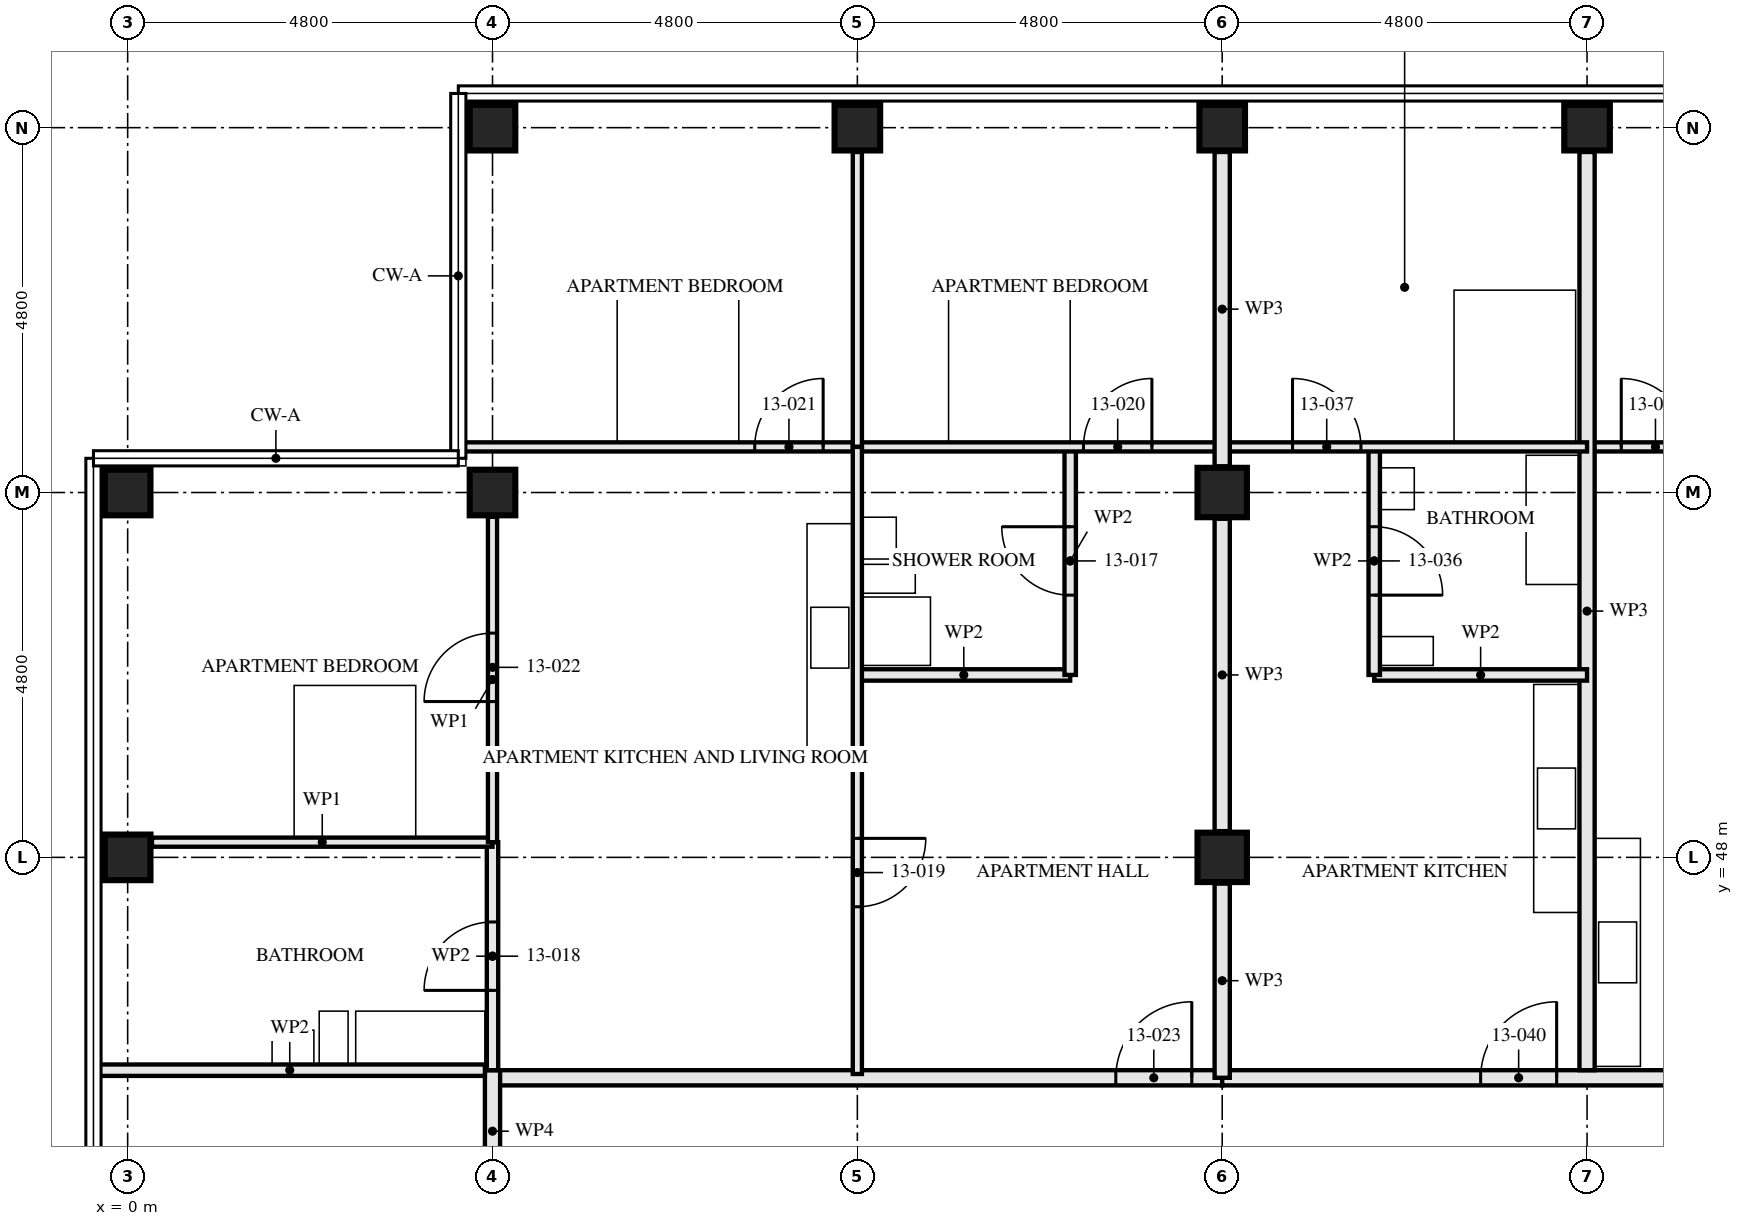
"""IFC4 building model, lengths in metres.
Left out: names, types, materials, properties, quantities, classifications, styles, units other than length and angle.
Written with IfcOpenShell. Run it as: python <this file> out.ifc"""

import sys

from ifc_helpers import new_model, si_unit, direction, frame, frame_2d, origin, origin_2d, place, context, subcontext, project, spatial, rectangle, hollow_rectangle, extrude, element, fill, save


model = new_model("IFC4")
c1 = context("Model", 3, precision=1e-05, world=origin(), true_north=direction((0.0, 1.0)))
c2 = subcontext(c1, "Body", "Model", "MODEL_VIEW")
j1 = project(units=[si_unit("LENGTHUNIT", "METRE"), si_unit("PLANEANGLEUNIT", "RADIAN")], contexts=[c1])
p1 = place(None, origin())
s1 = spatial("IfcSite", under=j1, at=p1, CompositionType="ELEMENT")
p2 = place(p1, origin())
s2 = spatial("IfcBuilding", under=s1, at=p2, CompositionType="ELEMENT")
p3 = place(p2, frame((0.0, 0.0, 51.5)))
s3 = spatial("IfcBuildingStorey", under=s2, at=p3, CompositionType="ELEMENT", Elevation=51.5)
p4 = place(p3, frame((0.0, 48.0, 0.0), z_axis=(0.0, 0.0, 1.0), x_axis=(1.0, 0.0, 0.0)))
e1 = element("IfcColumn", 1, at=p4, inside=s3, PredefinedType="COLUMN", context=c2, shape_type="SweptSolid", body=[
    extrude(hollow_rectangle(XDim=0.6, YDim=0.6, WallThickness=0.08, at=origin_2d()), origin(), (0.0, 0.0, 1.0), 3.5),
])
for number, where, z_axis, x_axis in (
    (2, (0.0, 52.8, 0.0), (0.0, 0.0, 1.0), (0.0, 1.0, 0.0)),
    (3, (4.8, 52.8, 0.0), (0.0, 0.0, 1.0), (0.0, 1.0, 0.0)),
    (4, (4.8, 57.6, 0.0), (0.0, 0.0, 1.0), (0.0, 1.0, 0.0)),
):
    element("IfcColumn", number, at=place(p3, frame(where, z_axis=z_axis, x_axis=x_axis)), inside=s3, PredefinedType="COLUMN", context=c2, shape_type="SweptSolid", body=[
        extrude(hollow_rectangle(XDim=0.6, YDim=0.6, WallThickness=0.06, at=origin_2d()), origin(), (0.0, 0.0, 1.0), 3.5),
    ])
p5 = place(p3, frame((9.6, 57.6, 0.0), z_axis=(0.0, 0.0, 1.0), x_axis=(0.0, 1.0, 0.0)))
e5 = element("IfcColumn", 5, at=p5, inside=s3, PredefinedType="COLUMN", context=c2, shape_type="SweptSolid", body=[
    extrude(hollow_rectangle(XDim=0.6, YDim=0.6, WallThickness=0.08, at=origin_2d()), origin(), (0.0, 0.0, 1.0), 3.5),
])
for number, where, z_axis, x_axis in (
    (6, (14.4, 48.0, 0.0), (0.0, 0.0, 1.0), (1.0, 0.0, 0.0)),
    (7, (14.4, 52.8, 0.0), (0.0, 0.0, 1.0), (1.0, 0.0, 0.0)),
):
    element("IfcColumn", number, at=place(p3, frame(where, z_axis=z_axis, x_axis=x_axis)), inside=s3, PredefinedType="COLUMN", context=c2, shape_type="SweptSolid", body=[
        extrude(hollow_rectangle(XDim=0.65, YDim=0.65, WallThickness=0.05, at=origin_2d()), origin(), (0.0, 0.0, 1.0), 3.5),
    ])
for number, where, z_axis, x_axis in (
    (8, (14.4, 57.6, 0.0), (0.0, 0.0, 1.0), (0.0, 1.0, 0.0)),
    (9, (19.2, 57.6, 0.0), (0.0, 0.0, 1.0), (0.0, 1.0, 0.0)),
):
    element("IfcColumn", number, at=place(p3, frame(where, z_axis=z_axis, x_axis=x_axis)), inside=s3, PredefinedType="COLUMN", context=c2, shape_type="SweptSolid", body=[
        extrude(hollow_rectangle(XDim=0.6, YDim=0.6, WallThickness=0.08, at=origin_2d()), origin(), (0.0, 0.0, 1.0), 3.5),
    ])
p6 = place(p3, frame((12.4, 53.4, 0.0), z_axis=(0.0, 0.0, 1.0), x_axis=(0.0, -1.0, 0.0)))
e10 = element("IfcWall", 10, at=p6, inside=s3, PredefinedType="PARTITIONING", context=c2, shape_type="SweptSolid", body=[
    extrude(rectangle(XDim=3.0, YDim=0.15, at=frame_2d((1.5, 0.0))), origin(), (0.0, 0.0, 1.0), 2.55),
])
p7 = place(p6, frame((1.05, 0.0, 0.0)))
e11 = element("IfcOpeningElement", 11, at=p7, cuts=e10, PredefinedType="OPENING", context=c2, shape_type="SweptSolid", body=[
    extrude(rectangle(XDim=0.9, YDim=2.1, at=frame_2d((0.45, 1.05))), frame((0.0, 0.085, 0.0), z_axis=(0.0, -1.0, 0.0), x_axis=(1.0, 0.0, 0.0)), (0.0, 0.0, 1.0), 0.171),
])
p8 = place(p3, frame((12.4, 50.4, 0.0), z_axis=(0.0, 0.0, 1.0), x_axis=(-1.0, 0.0, 0.0)))
e12 = element("IfcWall", 12, at=p8, inside=s3, PredefinedType="PARTITIONING", context=c2, shape_type="SweptSolid", body=[
    extrude(rectangle(XDim=2.8, YDim=0.15, at=frame_2d((1.4, 0.0))), origin(), (0.0, 0.0, 1.0), 3.33),
])
p9 = place(p3, frame((4.8, 48.2, 0.0), z_axis=(0.0, 0.0, 1.0), x_axis=(0.0, -1.0, 0.0)))
e13 = element("IfcWall", 13, at=p9, inside=s3, PredefinedType="PARTITIONING", context=c2, shape_type="SweptSolid", body=[
    extrude(rectangle(XDim=3.0, YDim=0.15, at=frame_2d((1.5, 0.0))), origin(), (0.0, 0.0, 1.0), 2.55),
])
p10 = place(p9, frame((1.05, 0.0, 0.0)))
e14 = element("IfcOpeningElement", 14, at=p10, cuts=e13, PredefinedType="OPENING", context=c2, shape_type="SweptSolid", body=[
    extrude(rectangle(XDim=0.9, YDim=2.1, at=frame_2d((0.45, 1.05))), frame((0.0, 0.085, 0.0), z_axis=(0.0, -1.0, 0.0), x_axis=(1.0, 0.0, 0.0)), (0.0, 0.0, 1.0), 0.171),
])
p11 = place(p3, frame((9.6, 53.4, 0.0), z_axis=(0.0, 0.0, 1.0), x_axis=(0.0, -1.0, 0.0)))
e15 = element("IfcWall", 15, at=p11, inside=s3, PredefinedType="PARTITIONING", context=c2, shape_type="SweptSolid", body=[
    extrude(rectangle(XDim=8.25, YDim=0.12, at=frame_2d((4.125, 0.0))), origin(), (0.0, 0.0, 1.0), 2.55),
])
p12 = place(p11, frame((5.15, 0.0, 0.0)))
e16 = element("IfcOpeningElement", 16, at=p12, cuts=e15, PredefinedType="OPENING", context=c2, shape_type="SweptSolid", body=[
    extrude(rectangle(XDim=0.9, YDim=2.1, at=frame_2d((0.45, 1.05))), frame((0.0, 0.071, 0.0), z_axis=(0.0, -1.0, 0.0), x_axis=(1.0, 0.0, 0.0)), (0.0, 0.0, 1.0), 0.141),
])
p13 = place(p3, frame((14.4, 53.4, 0.0), z_axis=(0.0, 0.0, 1.0), x_axis=(-1.0, 0.0, 0.0)))
e17 = element("IfcWall", 17, at=p13, inside=s3, PredefinedType="PARTITIONING", context=c2, shape_type="SweptSolid", body=[
    extrude(rectangle(XDim=4.8, YDim=0.12, at=frame_2d((2.4, 0.0))), origin(), (0.0, 0.0, 1.0), 3.33),
])
p14 = place(p13, frame((0.925, 0.0, 0.0)))
e18 = element("IfcOpeningElement", 18, at=p14, cuts=e17, PredefinedType="OPENING", context=c2, shape_type="SweptSolid", body=[
    extrude(rectangle(XDim=0.9, YDim=2.1, at=frame_2d((0.45, 1.05))), frame((0.0, 0.071, 0.0), z_axis=(0.0, -1.0, 0.0), x_axis=(1.0, 0.0, 0.0)), (0.0, 0.0, 1.0), 0.141),
])
p15 = place(p3, frame((9.6, 53.4, 0.0), z_axis=(0.0, 0.0, 1.0), x_axis=(-1.0, 0.0, 0.0)))
e19 = element("IfcWall", 19, at=p15, inside=s3, PredefinedType="PARTITIONING", context=c2, shape_type="SweptSolid", body=[
    extrude(rectangle(XDim=5.235, YDim=0.12, at=frame_2d((2.618, 0.0))), origin(), (0.0, 0.0, 1.0), 2.32),
])
p16 = place(p15, frame((0.45, 0.0, 0.0)))
e20 = element("IfcOpeningElement", 20, at=p16, cuts=e19, PredefinedType="OPENING", context=c2, shape_type="SweptSolid", body=[
    extrude(rectangle(XDim=0.9, YDim=2.1, at=frame_2d((0.45, 1.05))), frame((0.0, 0.071, 0.0), z_axis=(0.0, -1.0, 0.0), x_axis=(1.0, 0.0, 0.0)), (0.0, 0.0, 1.0), 0.141),
])
p17 = place(p3, frame((4.8, 48.2, 0.0), z_axis=(0.0, 0.0, 1.0), x_axis=(-1.0, 0.0, 0.0)))
e21 = element("IfcWall", 21, at=p17, inside=s3, PredefinedType="PARTITIONING", context=c2, shape_type="SweptSolid", body=[
    extrude(rectangle(XDim=4.48, YDim=0.12, at=frame_2d((2.24, 0.0))), origin(), (0.0, 0.0, 1.0), 3.33),
])
p18 = place(p3, frame((9.6, 57.28, 0.0), z_axis=(0.0, 0.0, 1.0), x_axis=(0.0, -1.0, 0.0)))
e22 = element("IfcWall", 22, at=p18, inside=s3, PredefinedType="PARTITIONING", context=c2, shape_type="SweptSolid", body=[
    extrude(rectangle(XDim=3.88, YDim=0.12, at=frame_2d((1.94, 0.0))), origin(), (0.0, 0.0, 1.0), 3.33),
])
p19 = place(p3, frame((4.8, 52.48, 0.0), z_axis=(0.0, 0.0, 1.0), x_axis=(0.0, -1.0, 0.0)))
e23 = element("IfcWall", 23, at=p19, inside=s3, PredefinedType="PARTITIONING", context=c2, shape_type="SweptSolid", body=[
    extrude(rectangle(XDim=4.28, YDim=0.12, at=frame_2d((2.14, 0.0))), origin(), (0.0, 0.0, 1.0), 3.33),
])
p20 = place(p19, frame((1.53, 0.0, 0.0)))
e24 = element("IfcOpeningElement", 24, at=p20, cuts=e23, PredefinedType="OPENING", context=c2, shape_type="SweptSolid", body=[
    extrude(rectangle(XDim=0.9, YDim=2.1, at=frame_2d((0.45, 1.05))), frame((0.0, 0.071, 0.0), z_axis=(0.0, -1.0, 0.0), x_axis=(1.0, 0.0, 0.0)), (0.0, 0.0, 1.0), 0.141),
])
p21 = place(p3, frame((14.4, 45.1, 0.0), z_axis=(0.0, 0.0, 1.0), x_axis=(-1.0, 0.0, 0.0)))
e25 = element("IfcWall", 25, at=p21, inside=s3, PredefinedType="PARTITIONING", context=c2, shape_type="SweptSolid", body=[
    extrude(rectangle(XDim=9.6, YDim=0.2, at=frame_2d((4.8, 0.0))), origin(), (0.0, 0.0, 1.0), 3.33),
])
p22 = place(p21, frame((0.4, 0.0, 0.0)))
e26 = element("IfcOpeningElement", 26, at=p22, cuts=e25, PredefinedType="OPENING", context=c2, shape_type="SweptSolid", body=[
    extrude(rectangle(XDim=1.0, YDim=2.1, at=frame_2d((0.5, 1.05))), frame((0.0, 0.111, 0.0), z_axis=(0.0, -1.0, 0.0), x_axis=(1.0, 0.0, 0.0)), (0.0, 0.0, 1.0), 0.221),
])
p23 = place(p3, frame((4.8, 45.2, 0.0), z_axis=(0.0, 0.0, 1.0), x_axis=(0.0, -1.0, 0.0)))
e27 = element("IfcWall", 27, at=p23, inside=s3, PredefinedType="PARTITIONING", context=c2, shape_type="SweptSolid", body=[
    extrude(rectangle(XDim=1.605, YDim=0.2, at=frame_2d((0.802, 0.0))), origin(), (0.0, 0.0, 1.0), 3.33),
])
p24 = place(p3, frame((24.0, 53.4, 0.0), z_axis=(0.0, 0.0, 1.0), x_axis=(-1.0, 0.0, 0.0)))
e28 = element("IfcWall", 28, at=p24, inside=s3, PredefinedType="PARTITIONING", context=c2, shape_type="SweptSolid", body=[
    extrude(rectangle(XDim=4.8, YDim=0.12, at=frame_2d((2.4, 0.0))), origin(), (0.0, 0.0, 1.0), 3.33),
])
p25 = place(p24, frame((3.45, 0.0, 0.0)))
e29 = element("IfcOpeningElement", 29, at=p25, cuts=e28, PredefinedType="OPENING", context=c2, shape_type="SweptSolid", body=[
    extrude(rectangle(XDim=0.9, YDim=2.1, at=frame_2d((0.45, 1.05))), frame((0.0, 0.071, 0.0), z_axis=(0.0, -1.0, 0.0), x_axis=(1.0, 0.0, 0.0)), (0.0, 0.0, 1.0), 0.141),
])
p26 = place(p3, frame((19.2, 57.28, 0.0), z_axis=(0.0, 0.0, 1.0), x_axis=(0.0, -1.0, 0.0)))
e30 = element("IfcWall", 30, at=p26, inside=s3, PredefinedType="PARTITIONING", context=c2, shape_type="SweptSolid", body=[
    extrude(rectangle(XDim=12.08, YDim=0.2, at=frame_2d((6.04, 0.0))), origin(), (0.0, 0.0, 1.0), 2.55),
])
p27 = place(p3, frame((16.4, 53.4, 0.0), z_axis=(0.0, 0.0, 1.0), x_axis=(0.0, -1.0, 0.0)))
e31 = element("IfcWall", 31, at=p27, inside=s3, PredefinedType="PARTITIONING", context=c2, shape_type="SweptSolid", body=[
    extrude(rectangle(XDim=3.0, YDim=0.15, at=frame_2d((1.5, 0.0))), origin(), (0.0, 0.0, 1.0), 2.55),
])
p28 = place(p27, frame((1.05, 0.0, 0.0)))
e32 = element("IfcOpeningElement", 32, at=p28, cuts=e31, PredefinedType="OPENING", context=c2, shape_type="SweptSolid", body=[
    extrude(rectangle(XDim=0.9, YDim=2.1, at=frame_2d((0.45, 1.05))), frame((0.0, 0.085, 0.0), z_axis=(0.0, -1.0, 0.0), x_axis=(1.0, 0.0, 0.0)), (0.0, 0.0, 1.0), 0.171),
])
p29 = place(p3, frame((19.2, 50.4, 0.0), z_axis=(0.0, 0.0, 1.0), x_axis=(-1.0, 0.0, 0.0)))
e33 = element("IfcWall", 33, at=p29, inside=s3, PredefinedType="PARTITIONING", context=c2, shape_type="SweptSolid", body=[
    extrude(rectangle(XDim=2.8, YDim=0.15, at=frame_2d((1.4, 0.0))), origin(), (0.0, 0.0, 1.0), 3.33),
])
p30 = place(p3, frame((19.2, 53.4, 0.0), z_axis=(0.0, 0.0, 1.0), x_axis=(-1.0, 0.0, 0.0)))
e34 = element("IfcWall", 34, at=p30, inside=s3, PredefinedType="PARTITIONING", context=c2, shape_type="SweptSolid", body=[
    extrude(rectangle(XDim=4.8, YDim=0.12, at=frame_2d((2.4, 0.0))), origin(), (0.0, 0.0, 1.0), 3.33),
])
p31 = place(p30, frame((2.975, 0.0, 0.0)))
e35 = element("IfcOpeningElement", 35, at=p31, cuts=e34, PredefinedType="OPENING", context=c2, shape_type="SweptSolid", body=[
    extrude(rectangle(XDim=0.9, YDim=2.1, at=frame_2d((0.45, 1.05))), frame((0.0, 0.071, 0.0), z_axis=(0.0, -1.0, 0.0), x_axis=(1.0, 0.0, 0.0)), (0.0, 0.0, 1.0), 0.141),
])
p32 = place(p3, frame((28.8, 45.1, 0.0), z_axis=(0.0, 0.0, 1.0), x_axis=(-1.0, 0.0, 0.0)))
e36 = element("IfcWall", 36, at=p32, inside=s3, PredefinedType="PARTITIONING", context=c2, shape_type="SweptSolid", body=[
    extrude(rectangle(XDim=14.4, YDim=0.2, at=frame_2d((7.2, 0.0))), origin(), (0.0, 0.0, 1.0), 3.33),
])
p33 = place(p32, frame((0.4, 0.0, 0.0)))
e37 = element("IfcOpeningElement", 37, at=p33, cuts=e36, PredefinedType="OPENING", context=c2, shape_type="SweptSolid", body=[
    extrude(rectangle(XDim=1.0, YDim=2.1, at=frame_2d((0.5, 1.05))), frame((0.0, 0.111, 0.0), z_axis=(0.0, -1.0, 0.0), x_axis=(1.0, 0.0, 0.0)), (0.0, 0.0, 1.0), 0.221),
])
p34 = place(p32, frame((5.2, 0.0, 0.0)))
e38 = element("IfcOpeningElement", 38, at=p34, cuts=e36, PredefinedType="OPENING", context=c2, shape_type="SweptSolid", body=[
    extrude(rectangle(XDim=1.0, YDim=2.1, at=frame_2d((0.5, 1.05))), frame((0.0, 0.111, 0.0), z_axis=(0.0, -1.0, 0.0), x_axis=(1.0, 0.0, 0.0)), (0.0, 0.0, 1.0), 0.221),
])
p35 = place(p32, frame((10.0, 0.0, 0.0)))
e39 = element("IfcOpeningElement", 39, at=p35, cuts=e36, PredefinedType="OPENING", context=c2, shape_type="SweptSolid", body=[
    extrude(rectangle(XDim=1.0, YDim=2.1, at=frame_2d((0.5, 1.05))), frame((0.0, 0.111, 0.0), z_axis=(0.0, -1.0, 0.0), x_axis=(1.0, 0.0, 0.0)), (0.0, 0.0, 1.0), 0.221),
])
p36 = place(p3, frame((14.4, 45.1, 0.0), z_axis=(0.0, 0.0, 1.0), x_axis=(0.0, 1.0, 0.0)))
e40 = element("IfcWall", 40, at=p36, inside=s3, PredefinedType="PARTITIONING", context=c2, shape_type="SweptSolid", body=[
    extrude(rectangle(XDim=2.555, YDim=0.2, at=frame_2d((1.277, 0.0))), origin(), (0.0, 0.0, 1.0), 2.32),
])
p37 = place(p3, frame((14.4, 48.345, 0.0), z_axis=(0.0, 0.0, 1.0), x_axis=(0.0, 1.0, 0.0)))
e41 = element("IfcWall", 41, at=p37, inside=s3, PredefinedType="PARTITIONING", context=c2, shape_type="SweptSolid", body=[
    extrude(rectangle(XDim=4.11, YDim=0.2, at=frame_2d((2.055, 0.0))), origin(), (0.0, 0.0, 1.0), 2.32),
])
p38 = place(p3, frame((14.4, 53.145, 0.0), z_axis=(0.0, 0.0, 1.0), x_axis=(0.0, 1.0, 0.0)))
e42 = element("IfcWall", 42, at=p38, inside=s3, PredefinedType="PARTITIONING", context=c2, shape_type="SweptSolid", body=[
    extrude(rectangle(XDim=4.135, YDim=0.2, at=frame_2d((2.067, 0.0))), origin(), (0.0, 0.0, 1.0), 2.32),
])
p39 = place(p3, frame((4.7, 45.2, 0.0), z_axis=(0.0, 0.0, 1.0), x_axis=(-1.0, 0.0, 0.0)))
e43 = element("IfcWall", 43, at=p39, inside=s3, PredefinedType="PARTITIONING", context=c2, shape_type="SweptSolid", body=[
    extrude(rectangle(XDim=5.135, YDim=0.15, at=frame_2d((2.567, 0.0))), origin(), (0.0, 0.0, 1.0), 2.32),
])
p40 = place(p7, frame((0.9, 0.0, 0.0), z_axis=(0.0, 0.0, 1.0), x_axis=(-1.0, 0.0, 0.0)))
e44 = element("IfcDoor", 44, at=p40, inside=s3, OperationType="SINGLE_SWING_LEFT", PredefinedType="DOOR", context=c2, shape_type="SweptSolid", body=[
    extrude(rectangle(XDim=0.9, YDim=2.1, at=frame_2d((0.45, 1.05))), frame((0.0, 0.022, 0.0), z_axis=(0.0, -1.0, 0.0), x_axis=(1.0, 0.0, 0.0)), (0.0, 0.0, 1.0), 0.044),
])
fill(e11, e44)
p41 = place(p10, frame((0.9, 0.0, 0.0), z_axis=(0.0, 0.0, 1.0), x_axis=(-1.0, 0.0, 0.0)))
e45 = element("IfcDoor", 45, at=p41, inside=s3, OperationType="SINGLE_SWING_RIGHT", PredefinedType="DOOR", context=c2, shape_type="SweptSolid", body=[
    extrude(rectangle(XDim=0.9, YDim=2.1, at=frame_2d((0.45, 1.05))), frame((0.0, 0.022, 0.0), z_axis=(0.0, -1.0, 0.0), x_axis=(1.0, 0.0, 0.0)), (0.0, 0.0, 1.0), 0.044),
])
fill(e14, e45)
p42 = place(p12, origin())
e46 = element("IfcDoor", 46, at=p42, inside=s3, OperationType="SINGLE_SWING_RIGHT", PredefinedType="DOOR", context=c2, shape_type="SweptSolid", body=[
    extrude(rectangle(XDim=0.9, YDim=2.1, at=frame_2d((0.45, 1.05))), frame((0.0, 0.022, 0.0), z_axis=(0.0, -1.0, 0.0), x_axis=(1.0, 0.0, 0.0)), (0.0, 0.0, 1.0), 0.044),
])
fill(e16, e46)
p43 = place(p14, frame((0.9, 0.0, 0.0), z_axis=(0.0, 0.0, 1.0), x_axis=(-1.0, 0.0, 0.0)))
e47 = element("IfcDoor", 47, at=p43, inside=s3, OperationType="SINGLE_SWING_LEFT", PredefinedType="DOOR", context=c2, shape_type="SweptSolid", body=[
    extrude(rectangle(XDim=0.9, YDim=2.1, at=frame_2d((0.45, 1.05))), frame((0.0, 0.022, 0.0), z_axis=(0.0, -1.0, 0.0), x_axis=(1.0, 0.0, 0.0)), (0.0, 0.0, 1.0), 0.044),
])
fill(e18, e47)
p44 = place(p16, frame((0.9, 0.0, 0.0), z_axis=(0.0, 0.0, 1.0), x_axis=(-1.0, 0.0, 0.0)))
e48 = element("IfcDoor", 48, at=p44, inside=s3, OperationType="SINGLE_SWING_LEFT", PredefinedType="DOOR", context=c2, shape_type="SweptSolid", body=[
    extrude(rectangle(XDim=0.9, YDim=2.1, at=frame_2d((0.45, 1.05))), frame((0.0, 0.022, 0.0), z_axis=(0.0, -1.0, 0.0), x_axis=(1.0, 0.0, 0.0)), (0.0, 0.0, 1.0), 0.044),
])
fill(e20, e48)
p45 = place(p20, frame((0.9, 0.0, 0.0), z_axis=(0.0, 0.0, 1.0), x_axis=(-1.0, 0.0, 0.0)))
e49 = element("IfcDoor", 49, at=p45, inside=s3, OperationType="SINGLE_SWING_RIGHT", PredefinedType="DOOR", context=c2, shape_type="SweptSolid", body=[
    extrude(rectangle(XDim=0.9, YDim=2.1, at=frame_2d((0.45, 1.05))), frame((0.0, 0.022, 0.0), z_axis=(0.0, -1.0, 0.0), x_axis=(1.0, 0.0, 0.0)), (0.0, 0.0, 1.0), 0.044),
])
fill(e24, e49)
p46 = place(p22, frame((1.0, 0.0, 0.0), z_axis=(0.0, 0.0, 1.0), x_axis=(-1.0, 0.0, 0.0)))
e50 = element("IfcDoor", 50, at=p46, inside=s3, OperationType="SINGLE_SWING_LEFT", PredefinedType="DOOR", context=c2, shape_type="SweptSolid", body=[
    extrude(rectangle(XDim=1.0, YDim=2.1, at=frame_2d((0.5, 1.05))), frame((0.0, 0.027, 0.0), z_axis=(0.0, -1.0, 0.0), x_axis=(1.0, 0.0, 0.0)), (0.0, 0.0, 1.0), 0.054),
])
fill(e26, e50)
p47 = place(p25, frame((0.9, 0.0, 0.0), z_axis=(0.0, 0.0, 1.0), x_axis=(-1.0, 0.0, 0.0)))
e51 = element("IfcDoor", 51, at=p47, inside=s3, OperationType="SINGLE_SWING_RIGHT", PredefinedType="DOOR", context=c2, shape_type="SweptSolid", body=[
    extrude(rectangle(XDim=0.9, YDim=2.1, at=frame_2d((0.45, 1.05))), frame((0.0, 0.022, 0.0), z_axis=(0.0, -1.0, 0.0), x_axis=(1.0, 0.0, 0.0)), (0.0, 0.0, 1.0), 0.044),
])
fill(e29, e51)
p48 = place(p28, origin())
e52 = element("IfcDoor", 52, at=p48, inside=s3, OperationType="SINGLE_SWING_LEFT", PredefinedType="DOOR", context=c2, shape_type="SweptSolid", body=[
    extrude(rectangle(XDim=0.9, YDim=2.1, at=frame_2d((0.45, 1.05))), frame((0.0, 0.022, 0.0), z_axis=(0.0, -1.0, 0.0), x_axis=(1.0, 0.0, 0.0)), (0.0, 0.0, 1.0), 0.044),
])
fill(e32, e52)
p49 = place(p31, frame((0.9, 0.0, 0.0), z_axis=(0.0, 0.0, 1.0), x_axis=(-1.0, 0.0, 0.0)))
e53 = element("IfcDoor", 53, at=p49, inside=s3, OperationType="SINGLE_SWING_RIGHT", PredefinedType="DOOR", context=c2, shape_type="SweptSolid", body=[
    extrude(rectangle(XDim=0.9, YDim=2.1, at=frame_2d((0.45, 1.05))), frame((0.0, 0.022, 0.0), z_axis=(0.0, -1.0, 0.0), x_axis=(1.0, 0.0, 0.0)), (0.0, 0.0, 1.0), 0.044),
])
fill(e35, e53)
p50 = place(p35, frame((1.0, 0.0, 0.0), z_axis=(0.0, 0.0, 1.0), x_axis=(-1.0, 0.0, 0.0)))
e54 = element("IfcDoor", 54, at=p50, inside=s3, OperationType="SINGLE_SWING_LEFT", PredefinedType="DOOR", context=c2, shape_type="SweptSolid", body=[
    extrude(rectangle(XDim=1.0, YDim=2.1, at=frame_2d((0.5, 1.05))), frame((0.0, 0.027, 0.0), z_axis=(0.0, -1.0, 0.0), x_axis=(1.0, 0.0, 0.0)), (0.0, 0.0, 1.0), 0.054),
])
fill(e39, e54)
save(model, sys.argv[1])
